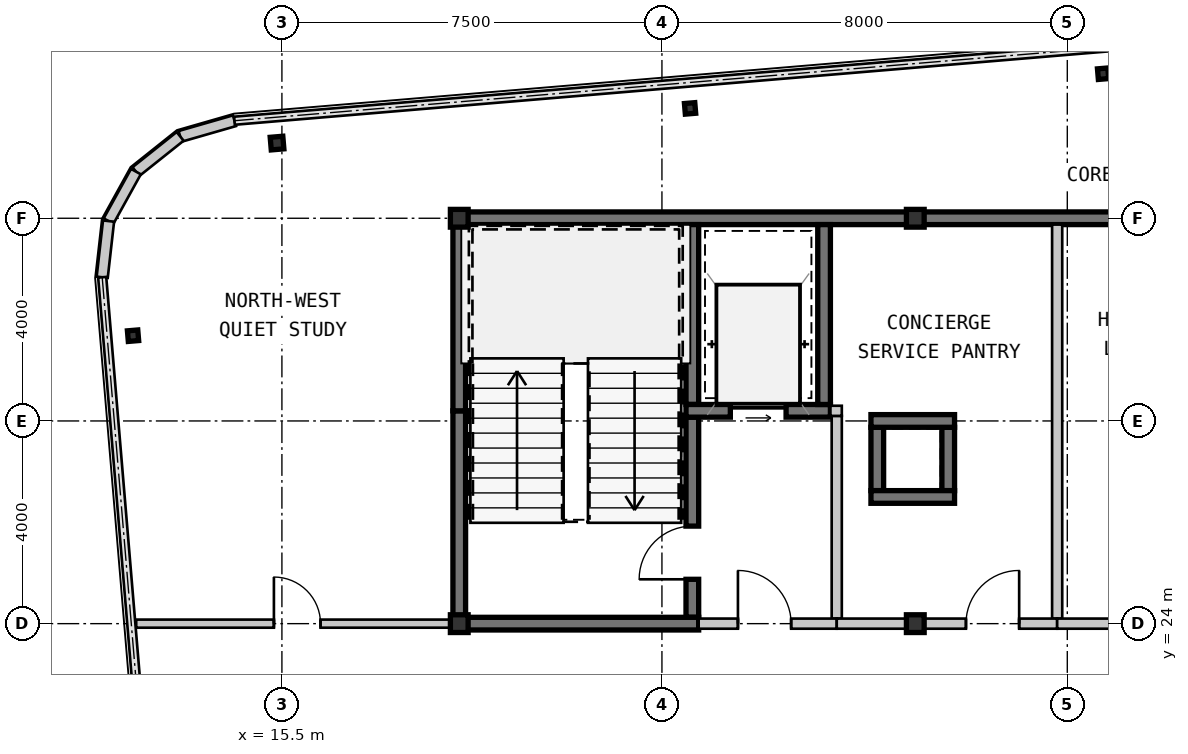
"""IFC4 building model, lengths in metres.
Left out: names, types, materials, properties, quantities, classifications, styles, units other than length and angle.
Written with IfcOpenShell. Run it as: python <this file> out.ifc"""

import sys

from ifc_helpers import new_model, si_unit, direction, frame, frame_2d, origin, origin_2d, place, context, subcontext, project, spatial, rectangle, hollow_rectangle, i_section, extrude, source, transform, mapped, element, fill, save


model = new_model("IFC4")
c1 = context("Model", 3, precision=1e-05, world=origin(), true_north=direction((0.0, 1.0)))
c2 = subcontext(c1, "Body", "Model", "MODEL_VIEW")
j1 = project(units=[si_unit("LENGTHUNIT", "METRE"), si_unit("PLANEANGLEUNIT", "RADIAN")], contexts=[c1])
p1 = place(None, origin())
s1 = spatial("IfcSite", under=j1, at=p1, CompositionType="ELEMENT")
p2 = place(p1, origin())
s2 = spatial("IfcBuilding", under=s1, at=p2, CompositionType="ELEMENT")
p3 = place(p2, frame((0.0, 0.0, 172.55)))
s3 = spatial("IfcBuildingStorey", under=s2, at=p3, CompositionType="ELEMENT", Elevation=172.55)
m1 = source(origin(), c2, "Body", "SweptSolid", [
    extrude(hollow_rectangle(XDim=0.35, YDim=0.35, WallThickness=0.016, at=origin_2d()), origin(), (0.0, 0.0, 1.0), 3.15),
])
for number, where, z_axis, x_axis in (
    (1, (19.0, 24.0, 0.0), (0.0, 0.0, 1.0), (1.0, 0.0, 0.0)),
    (2, (28.0, 24.0, 0.0), (0.0, 0.0, 1.0), (1.0, 0.0, 0.0)),
    (3, (19.0, 32.0, 0.0), (0.0, 0.0, 1.0), (1.0, 0.0, 0.0)),
    (4, (28.0, 32.0, 0.0), (0.0, 0.0, 1.0), (1.0, 0.0, 0.0)),
):
    element("IfcColumn", number, at=place(p3, frame(where, z_axis=z_axis, x_axis=x_axis)), inside=s3, PredefinedType="COLUMN", context=c2, shape_type="MappedRepresentation", body=[
        mapped(m1, transform((0.0, 0.0, 0.0), scale=1.0)),
    ])
m2 = source(origin(), c2, "Body", "SweptSolid", [
    extrude(hollow_rectangle(XDim=0.25, YDim=0.25, WallThickness=0.01, at=origin_2d()), origin(), (0.0, 0.0, 1.0), 3.15),
])
p4 = place(p3, frame((15.404, 33.484, 0.0), z_axis=(0.0, 0.0, 1.0), x_axis=(0.99649285925, 0.083677843332, 0.0)))
e5 = element("IfcColumn", 5, at=p4, inside=s3, PredefinedType="COLUMN", context=c2, shape_type="MappedRepresentation", body=[
    mapped(m2, transform((0.0, 0.0, 0.0), scale=1.0)),
])
m3 = source(origin(), c2, "Body", "SweptSolid", [
    extrude(i_section(OverallWidth=0.205, OverallDepth=0.21, WebThickness=0.009, FlangeThickness=0.014, at=origin_2d()), origin(), (0.0, 0.0, 1.0), 3.15),
])
for number, where, z_axis, x_axis in (
    (6, (23.555, 34.168, 0.0), (0.0, 0.0, 1.0), (0.996, 0.084, 0.0)),
    (7, (31.706, 34.853, 0.0), (0.0, 0.0, 1.0), (0.996, 0.084, 0.0)),
    (8, (12.562, 29.682, 0.0), (0.0, 0.0, 1.0), (0.996, 0.084, 0.0)),
):
    element("IfcColumn", number, at=place(p3, frame(where, z_axis=z_axis, x_axis=x_axis)), inside=s3, PredefinedType="COLUMN", context=c2, shape_type="MappedRepresentation", body=[
        mapped(m3, transform((0.0, 0.0, 0.0), scale=1.0)),
    ])
m4 = source(origin(), c2, "Body", "SweptSolid", [
    extrude(rectangle(XDim=1.116, YDim=0.22, at=frame_2d((0.558, 0.0))), origin(), (0.0, 0.0, 1.0), 2.93),
])
p5 = place(p3, frame((14.564, 33.925, 0.0), z_axis=(0.0, 0.0, 1.0), x_axis=(-0.961010464297, -0.276512002475, 0.0)))
e9 = element("IfcWall", 9, at=p5, inside=s3, PredefinedType="SOLIDWALL", context=c2, shape_type="MappedRepresentation", body=[
    mapped(m4, transform((0.0, 0.0, 0.0), scale=1.0)),
])
m5 = source(origin(), c2, "Body", "SweptSolid", [
    extrude(rectangle(XDim=1.116, YDim=0.22, at=frame_2d((0.558, 0.0))), origin(), (0.0, 0.0, 1.0), 2.93),
])
p6 = place(p3, frame((13.491, 33.616, 0.0), z_axis=(0.0, 0.0, 1.0), x_axis=(-0.782062884215, -0.623199522732, 0.0)))
e10 = element("IfcWall", 10, at=p6, inside=s3, PredefinedType="SOLIDWALL", context=c2, shape_type="MappedRepresentation", body=[
    mapped(m5, transform((0.0, 0.0, 0.0), scale=1.0)),
])
for number, where, z_axis, x_axis in (
    (11, (12.619, 32.921, 0.0), (0.0, 0.0, 1.0), (-0.484, -0.875, 0.0)),
    (12, (12.079, 31.944, 0.0), (0.0, 0.0, 1.0), (-0.112, -0.994, 0.0)),
):
    element("IfcWall", number, at=place(p3, frame(where, z_axis=z_axis, x_axis=x_axis)), inside=s3, PredefinedType="SOLIDWALL", context=c2, shape_type="MappedRepresentation", body=[
        mapped(m4, transform((0.0, 0.0, 0.0), scale=1.0)),
    ])
m6 = source(origin(), c2, "Body", "SweptSolid", [
    extrude(rectangle(XDim=9.125, YDim=0.25, at=frame_2d((4.562, 0.0))), origin(), (0.0, 0.0, 1.0), 2.93),
])
p7 = place(p3, frame((18.875, 32.0, 0.0), z_axis=(0.0, 0.0, 1.0), x_axis=(1.0, 0.0, 0.0)))
e13 = element("IfcWall", 13, at=p7, inside=s3, PredefinedType="SHEAR", context=c2, shape_type="MappedRepresentation", body=[
    mapped(m6, transform((0.0, 0.0, 0.0), scale=1.0)),
])
m7 = source(origin(), c2, "Body", "SweptSolid", [
    extrude(rectangle(XDim=11.2, YDim=0.25, at=frame_2d((5.6, 0.0))), origin(), (0.0, 0.0, 1.0), 2.93),
])
p8 = place(p3, frame((28.0, 32.0, 0.0), z_axis=(0.0, 0.0, 1.0), x_axis=(1.0, 0.0, 0.0)))
e14 = element("IfcWall", 14, at=p8, inside=s3, PredefinedType="SHEAR", context=c2, shape_type="MappedRepresentation", body=[
    mapped(m7, transform((0.0, 0.0, 0.0), scale=1.0)),
])
m8 = source(origin(), c2, "Body", "SweptSolid", [
    extrude(rectangle(XDim=4.075, YDim=0.25, at=frame_2d((2.038, 0.0))), origin(), (0.0, 0.0, 1.0), 2.93),
])
p9 = place(p3, frame((19.0, 24.125, 0.0), z_axis=(0.0, 0.0, 1.0), x_axis=(0.0, 1.0, 0.0)))
e15 = element("IfcWall", 15, at=p9, inside=s3, PredefinedType="SHEAR", context=c2, shape_type="MappedRepresentation", body=[
    mapped(m8, transform((0.0, 0.0, 0.0), scale=1.0)),
])
m9 = source(origin(), c2, "Body", "SweptSolid", [
    extrude(rectangle(XDim=3.675, YDim=0.25, at=frame_2d((1.837, 0.0))), origin(), (0.0, 0.0, 1.0), 2.93),
])
p10 = place(p3, frame((19.0, 28.2, 0.0), z_axis=(0.0, 0.0, 1.0), x_axis=(0.0, 1.0, 0.0)))
e16 = element("IfcWall", 16, at=p10, inside=s3, PredefinedType="SHEAR", context=c2, shape_type="MappedRepresentation", body=[
    mapped(m9, transform((0.0, 0.0, 0.0), scale=1.0)),
])
m10 = source(origin(), c2, "Body", "SweptSolid", [
    extrude(rectangle(XDim=3.55, YDim=0.25, at=frame_2d((1.775, 0.0))), origin(), (0.0, 0.0, 1.0), 2.93),
])
p11 = place(p3, frame((23.6, 28.325, 0.0), z_axis=(0.0, 0.0, 1.0), x_axis=(0.0, 1.0, 0.0)))
e17 = element("IfcWall", 17, at=p11, inside=s3, PredefinedType="SHEAR", context=c2, shape_type="MappedRepresentation", body=[
    mapped(m10, transform((0.0, 0.0, 0.0), scale=1.0)),
])
m11 = source(origin(), c2, "Body", "SweptSolid", [
    extrude(rectangle(XDim=3.95, YDim=0.25, at=frame_2d((1.975, 0.0))), origin(), (0.0, 0.0, 1.0), 2.93),
])
p12 = place(p3, frame((23.6, 24.125, 0.0), z_axis=(0.0, 0.0, 1.0), x_axis=(0.0, 1.0, 0.0)))
e18 = element("IfcWall", 18, at=p12, inside=s3, PredefinedType="SHEAR", context=c2, shape_type="MappedRepresentation", body=[
    mapped(m11, transform((0.0, 0.0, 0.0), scale=1.0)),
])
m12 = source(origin(), c2, "Body", "SweptSolid", [
    extrude(rectangle(XDim=1.05, YDim=2.1, at=frame_2d((0.525, 1.05))), frame((0.0, 0.135, 0.0), z_axis=(0.0, -1.0, 0.0), x_axis=(1.0, 0.0, 0.0)), (0.0, 0.0, 1.0), 0.27),
])
p13 = place(p12, frame((0.75, 0.0, 0.0)))
e19 = element("IfcOpeningElement", 19, at=p13, cuts=e18, PredefinedType="OPENING", context=c2, shape_type="MappedRepresentation", body=[
    mapped(m12, transform((0.0, 0.0, 0.0), scale=1.0)),
])
m13 = source(origin(), c2, "Body", "SweptSolid", [
    extrude(rectangle(XDim=4.85, YDim=0.25, at=frame_2d((2.425, 0.0))), origin(), (0.0, 0.0, 1.0), 2.93),
])
p14 = place(p3, frame((18.875, 24.0, 0.0), z_axis=(0.0, 0.0, 1.0), x_axis=(1.0, 0.0, 0.0)))
e20 = element("IfcWall", 20, at=p14, inside=s3, PredefinedType="SHEAR", context=c2, shape_type="MappedRepresentation", body=[
    mapped(m13, transform((0.0, 0.0, 0.0), scale=1.0)),
])
m14 = source(origin(), c2, "Body", "SweptSolid", [
    extrude(rectangle(XDim=2.85, YDim=0.25, at=frame_2d((1.425, 0.0))), origin(), (0.0, 0.0, 1.0), 2.93),
])
p15 = place(p3, frame((23.475, 28.2, 0.0), z_axis=(0.0, 0.0, 1.0), x_axis=(1.0, 0.0, 0.0)))
e21 = element("IfcWall", 21, at=p15, inside=s3, PredefinedType="SHEAR", context=c2, shape_type="MappedRepresentation", body=[
    mapped(m14, transform((0.0, 0.0, 0.0), scale=1.0)),
])
m15 = source(origin(), c2, "Body", "SweptSolid", [
    extrude(rectangle(XDim=1.1, YDim=2.15, at=frame_2d((0.55, 1.075))), frame((0.0, 0.135, 0.0), z_axis=(0.0, -1.0, 0.0), x_axis=(1.0, 0.0, 0.0)), (0.0, 0.0, 1.0), 0.27),
])
p16 = place(p15, frame((0.875, 0.0, 0.0)))
e22 = element("IfcOpeningElement", 22, at=p16, cuts=e21, PredefinedType="OPENING", context=c2, shape_type="MappedRepresentation", body=[
    mapped(m15, transform((0.0, 0.0, 0.0), scale=1.0)),
])
p17 = place(p3, frame((26.2, 28.325, 0.0), z_axis=(0.0, 0.0, 1.0), x_axis=(0.0, 1.0, 0.0)))
e23 = element("IfcWall", 23, at=p17, inside=s3, PredefinedType="SHEAR", context=c2, shape_type="MappedRepresentation", body=[
    mapped(m10, transform((0.0, 0.0, 0.0), scale=1.0)),
])
m16 = source(origin(), c2, "Body", "SweptSolid", [
    extrude(rectangle(XDim=4.0, YDim=0.2, at=frame_2d((2.0, 0.0))), origin(), (0.0, 0.0, 1.0), 2.93),
])
p18 = place(p3, frame((26.45, 24.1, 0.0), z_axis=(0.0, 0.0, 1.0), x_axis=(0.0, 1.0, 0.0)))
e24 = element("IfcWall", 24, at=p18, inside=s3, PredefinedType="SOLIDWALL", context=c2, shape_type="MappedRepresentation", body=[
    mapped(m16, transform((0.0, 0.0, 0.0), scale=1.0)),
])
m17 = source(origin(), c2, "Body", "SweptSolid", [
    extrude(rectangle(XDim=2.725, YDim=0.2, at=frame_2d((1.362, 0.0))), origin(), (0.0, 0.0, 1.0), 2.47),
])
p19 = place(p3, frame((23.725, 24.0, 0.0), z_axis=(0.0, 0.0, 1.0), x_axis=(1.0, 0.0, 0.0)))
e25 = element("IfcWall", 25, at=p19, inside=s3, PredefinedType="SOLIDWALL", context=c2, shape_type="MappedRepresentation", body=[
    mapped(m17, transform((0.0, 0.0, 0.0), scale=1.0)),
])
m18 = source(origin(), c2, "Body", "SweptSolid", [
    extrude(rectangle(XDim=1.05, YDim=2.1, at=frame_2d((0.525, 1.05))), frame((0.0, 0.11, 0.0), z_axis=(0.0, -1.0, 0.0), x_axis=(1.0, 0.0, 0.0)), (0.0, 0.0, 1.0), 0.22),
])
p20 = place(p19, frame((0.775, 0.0, 0.0)))
e26 = element("IfcOpeningElement", 26, at=p20, cuts=e25, PredefinedType="OPENING", context=c2, shape_type="MappedRepresentation", body=[
    mapped(m18, transform((0.0, 0.0, 0.0), scale=1.0)),
])
m19 = source(origin(), c2, "Body", "SweptSolid", [
    extrude(rectangle(XDim=1.25, YDim=0.25, at=frame_2d((0.625, 0.0))), origin(), (0.0, 0.0, 1.0), 2.93),
])
for number, where, z_axis, x_axis in (
    (27, (28.65, 26.625, 0.0), (0.0, 0.0, 1.0), (0.0, 1.0, 0.0)),
    (28, (27.25, 27.875, 0.0), (0.0, 0.0, 1.0), (0.0, -1.0, 0.0)),
):
    element("IfcWall", number, at=place(p3, frame(where, z_axis=z_axis, x_axis=x_axis)), inside=s3, PredefinedType="SHEAR", context=c2, shape_type="MappedRepresentation", body=[
        mapped(m19, transform((0.0, 0.0, 0.0), scale=1.0)),
    ])
m20 = source(origin(), c2, "Body", "SweptSolid", [
    extrude(rectangle(XDim=1.65, YDim=0.25, at=frame_2d((0.825, 0.0))), origin(), (0.0, 0.0, 1.0), 2.93),
])
for number, where, z_axis, x_axis in (
    (29, (28.775, 28.0, 0.0), (0.0, 0.0, 1.0), (-1.0, 0.0, 0.0)),
    (30, (27.125, 26.5, 0.0), (0.0, 0.0, 1.0), (1.0, 0.0, 0.0)),
):
    element("IfcWall", number, at=place(p3, frame(where, z_axis=z_axis, x_axis=x_axis)), inside=s3, PredefinedType="SHEAR", context=c2, shape_type="MappedRepresentation", body=[
        mapped(m20, transform((0.0, 0.0, 0.0), scale=1.0)),
    ])
m21 = source(origin(), c2, "Body", "SweptSolid", [
    extrude(rectangle(XDim=7.775, YDim=0.2, at=frame_2d((3.887, 0.0))), origin(), (0.0, 0.0, 1.0), 2.93),
])
p21 = place(p3, frame((30.8, 31.875, 0.0), z_axis=(0.0, 0.0, 1.0), x_axis=(0.0, -1.0, 0.0)))
e31 = element("IfcWall", 31, at=p21, inside=s3, PredefinedType="SOLIDWALL", context=c2, shape_type="MappedRepresentation", body=[
    mapped(m21, transform((0.0, 0.0, 0.0), scale=1.0)),
])
m22 = source(origin(), c2, "Body", "SweptSolid", [
    extrude(rectangle(XDim=4.35, YDim=0.2, at=frame_2d((2.175, 0.0))), origin(), (0.0, 0.0, 1.0), 2.47),
])
p22 = place(p3, frame((30.8, 24.0, 0.0), z_axis=(0.0, 0.0, 1.0), x_axis=(-1.0, 0.0, 0.0)))
e32 = element("IfcWall", 32, at=p22, inside=s3, PredefinedType="SOLIDWALL", context=c2, shape_type="MappedRepresentation", body=[
    mapped(m22, transform((0.0, 0.0, 0.0), scale=1.0)),
])
p23 = place(p22, frame((0.75, 0.0, 0.0)))
e33 = element("IfcOpeningElement", 33, at=p23, cuts=e32, PredefinedType="OPENING", context=c2, shape_type="MappedRepresentation", body=[
    mapped(m18, transform((0.0, 0.0, 0.0), scale=1.0)),
])
m23 = source(origin(), c2, "Body", "SweptSolid", [
    extrude(rectangle(XDim=4.35, YDim=0.2, at=frame_2d((2.175, 0.0))), origin(), (0.0, 0.0, 1.0), 2.47),
])
p24 = place(p3, frame((35.15, 24.0, 0.0), z_axis=(0.0, 0.0, 1.0), x_axis=(-1.0, 0.0, 0.0)))
e34 = element("IfcWall", 34, at=p24, inside=s3, PredefinedType="SOLIDWALL", context=c2, shape_type="MappedRepresentation", body=[
    mapped(m23, transform((0.0, 0.0, 0.0), scale=1.0)),
])
p25 = place(p24, frame((1.65, 0.0, 0.0)))
e35 = element("IfcOpeningElement", 35, at=p25, cuts=e34, PredefinedType="OPENING", context=c2, shape_type="MappedRepresentation", body=[
    mapped(m18, transform((0.0, 0.0, 0.0), scale=1.0)),
])
m24 = source(origin(), c2, "Body", "SweptSolid", [
    extrude(rectangle(XDim=6.251, YDim=0.16, at=frame_2d((3.125, 0.0))), origin(), (0.0, 0.0, 1.0), 2.93),
])
p26 = place(p3, frame((12.624, 24.0, 0.0), z_axis=(0.0, 0.0, 1.0), x_axis=(1.0, 0.0, 0.0)))
e36 = element("IfcWall", 36, at=p26, inside=s3, PredefinedType="PARTITIONING", context=c2, shape_type="MappedRepresentation", body=[
    mapped(m24, transform((0.0, 0.0, 0.0), scale=1.0)),
])
m25 = source(origin(), c2, "Body", "SweptSolid", [
    extrude(rectangle(XDim=0.92, YDim=2.1, at=frame_2d((0.46, 1.05))), frame((0.0, 0.09, 0.0), z_axis=(0.0, -1.0, 0.0), x_axis=(1.0, 0.0, 0.0)), (0.0, 0.0, 1.0), 0.18),
])
p27 = place(p26, frame((2.718, 0.0, 0.0)))
e37 = element("IfcOpeningElement", 37, at=p27, cuts=e36, PredefinedType="OPENING", context=c2, shape_type="MappedRepresentation", body=[
    mapped(m25, transform((0.0, 0.0, 0.0), scale=1.0)),
])
m26 = source(origin(), c2, "Body", "SweptSolid", [
    extrude(rectangle(XDim=0.225, YDim=0.2, at=frame_2d((0.113, 0.0))), origin(), (0.0, 0.0, 1.0), 2.93),
])
p28 = place(p3, frame((26.325, 28.2, 0.0), z_axis=(0.0, 0.0, 1.0), x_axis=(1.0, 0.0, 0.0)))
e38 = element("IfcWall", 38, at=p28, inside=s3, PredefinedType="SOLIDWALL", context=c2, shape_type="MappedRepresentation", body=[
    mapped(m26, transform((0.0, 0.0, 0.0), scale=1.0)),
])
m27 = source(origin(), c2, "Body", "SweptSolid", [
    extrude(rectangle(XDim=1.05, YDim=2.1, at=frame_2d((0.525, 1.05))), frame((0.0, 0.025, 0.0), z_axis=(0.0, -1.0, 0.0), x_axis=(1.0, 0.0, 0.0)), (0.0, 0.0, 1.0), 0.05),
])
p29 = place(p13, origin())
e39 = element("IfcDoor", 39, at=p29, inside=s3, OperationType="SINGLE_SWING_LEFT", PredefinedType="DOOR", context=c2, shape_type="MappedRepresentation", body=[
    mapped(m27, transform((0.0, 0.0, 0.0), scale=1.0)),
])
fill(e19, e39)
m28 = source(origin(), c2, "Body", "SweptSolid", [
    extrude(rectangle(XDim=1.1, YDim=2.15, at=frame_2d((0.55, 1.075))), frame((0.0, 0.025, 0.0), z_axis=(0.0, -1.0, 0.0), x_axis=(1.0, 0.0, 0.0)), (0.0, 0.0, 1.0), 0.05),
])
p30 = place(p16, origin())
e40 = element("IfcDoor", 40, at=p30, inside=s3, OperationType="SLIDING_TO_LEFT", PredefinedType="DOOR", context=c2, shape_type="MappedRepresentation", body=[
    mapped(m28, transform((0.0, 0.0, 0.0), scale=1.0)),
])
fill(e22, e40)
p31 = place(p20, origin())
e41 = element("IfcDoor", 41, at=p31, inside=s3, OperationType="SINGLE_SWING_LEFT", PredefinedType="DOOR", context=c2, shape_type="MappedRepresentation", body=[
    mapped(m27, transform((0.0, 0.0, 0.0), scale=1.0)),
])
fill(e26, e41)
p32 = place(p23, frame((1.05, 0.0, 0.0), z_axis=(0.0, 0.0, 1.0), x_axis=(-1.0, 0.0, 0.0)))
e42 = element("IfcDoor", 42, at=p32, inside=s3, OperationType="SINGLE_SWING_RIGHT", PredefinedType="DOOR", context=c2, shape_type="MappedRepresentation", body=[
    mapped(m27, transform((0.0, 0.0, 0.0), scale=1.0)),
])
fill(e33, e42)
m29 = source(origin(), c2, "Body", "SweptSolid", [
    extrude(rectangle(XDim=0.92, YDim=2.1, at=frame_2d((0.46, 1.05))), frame((0.0, 0.025, 0.0), z_axis=(0.0, -1.0, 0.0), x_axis=(1.0, 0.0, 0.0)), (0.0, 0.0, 1.0), 0.05),
])
p33 = place(p27, origin())
e43 = element("IfcDoor", 43, at=p33, inside=s3, OperationType="SINGLE_SWING_LEFT", PredefinedType="DOOR", context=c2, shape_type="MappedRepresentation", body=[
    mapped(m29, transform((0.0, 0.0, 0.0), scale=1.0)),
])
fill(e37, e43)
save(model, sys.argv[1])
